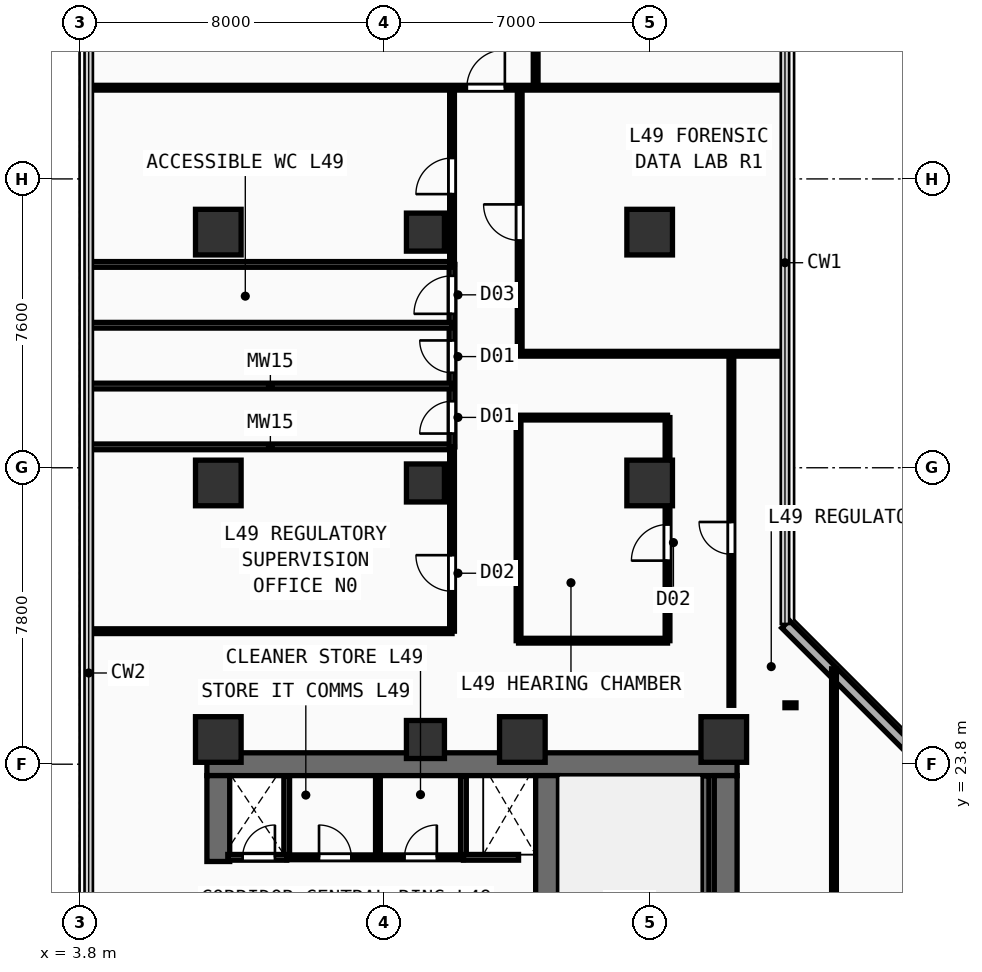
"""IFC4 building model, lengths in metres.
Left out: names, types, materials, properties, quantities, classifications, styles, units other than length and angle.
Written with IfcOpenShell. Run it as: python <this file> out.ifc"""

import sys

from ifc_helpers import new_model, si_unit, direction, frame, frame_2d, origin, origin_2d, place, context, subcontext, project, spatial, rectangle, extrude, element, fill, save


model = new_model("IFC4")
c1 = context("Model", 3, precision=1e-05, world=origin(), true_north=direction((0.0, 1.0)))
c2 = subcontext(c1, "Body", "Model", "MODEL_VIEW")
j1 = project(units=[si_unit("LENGTHUNIT", "METRE"), si_unit("PLANEANGLEUNIT", "RADIAN")], contexts=[c1])
p1 = place(None, origin())
s1 = spatial("IfcSite", under=j1, at=p1, CompositionType="ELEMENT")
p2 = place(p1, origin())
s2 = spatial("IfcBuilding", under=s1, at=p2, CompositionType="ELEMENT")
p3 = place(p2, frame((0.0, 0.0, 191.8)))
s3 = spatial("IfcBuildingStorey", under=s2, at=p3, CompositionType="ELEMENT", Elevation=191.8)
p4 = place(p3, frame((7.15, 23.8, 0.0), z_axis=(0.0, 0.0, 1.0), x_axis=(1.0, 0.0, 0.0)))
e1 = element("IfcWall", 1, at=p4, inside=s3, PredefinedType="SHEAR", context=c2, shape_type="SweptSolid", body=[
    extrude(rectangle(XDim=13.95, YDim=0.6, at=frame_2d((6.975, 0.0))), origin(), (0.0, 0.0, 1.0), 3.56),
])
p5 = place(p3, frame((7.45, 21.24, 0.0), z_axis=(0.0, 0.0, 1.0), x_axis=(0.0, 1.0, 0.0)))
e2 = element("IfcWall", 2, at=p5, inside=s3, PredefinedType="SHEAR", context=c2, shape_type="SweptSolid", body=[
    extrude(rectangle(XDim=2.26, YDim=0.6, at=frame_2d((1.13, 0.0))), origin(), (0.0, 0.0, 1.0), 3.56),
])
p6 = place(p3, frame((20.8, 17.35, 0.0), z_axis=(0.0, 0.0, 1.0), x_axis=(0.0, 1.0, 0.0)))
e3 = element("IfcWall", 3, at=p6, inside=s3, PredefinedType="SHEAR", context=c2, shape_type="SweptSolid", body=[
    extrude(rectangle(XDim=6.15, YDim=0.6, at=frame_2d((3.075, 0.0))), origin(), (0.0, 0.0, 1.0), 3.56),
])
p7 = place(p3, frame((16.1, 14.4, 0.0), z_axis=(0.0, 0.0, 1.0), x_axis=(0.0, 1.0, 0.0)))
e4 = element("IfcWall", 4, at=p7, inside=s3, PredefinedType="SHEAR", context=c2, shape_type="SweptSolid", body=[
    extrude(rectangle(XDim=9.1, YDim=0.6, at=frame_2d((4.55, 0.0))), origin(), (0.0, 0.0, 1.0), 3.56),
])
for number, where, z_axis, x_axis in (
    (5, (7.45, 24.45, 0.0), (0.0, 0.0, 1.0), (1.0, 0.0, 0.0)),
    (6, (15.45, 24.45, 0.0), (0.0, 0.0, 1.0), (1.0, 0.0, 0.0)),
    (7, (20.75, 24.45, 0.0), (0.0, 0.0, 1.0), (1.0, 0.0, 0.0)),
    (8, (7.45, 31.2, 0.0), (0.0, 0.0, 1.0), (1.0, 0.0, 0.0)),
    (9, (7.45, 37.8, 0.0), (0.0, 0.0, 1.0), (1.0, 0.0, 0.0)),
    (10, (18.8, 31.2, 0.0), (0.0, 0.0, 1.0), (1.0, 0.0, 0.0)),
    (11, (18.8, 37.8, 0.0), (0.0, 0.0, 1.0), (1.0, 0.0, 0.0)),
):
    element("IfcColumn", number, at=place(p3, frame(where, z_axis=z_axis, x_axis=x_axis)), inside=s3, PredefinedType="COLUMN", context=c2, shape_type="SweptSolid", body=[
        extrude(rectangle(XDim=1.2, YDim=1.2, at=origin_2d()), origin(), (0.0, 0.0, 1.0), 3.56),
    ])
for number, where, z_axis, x_axis in (
    (12, (12.9, 24.45, 0.0), (0.0, 0.0, 1.0), (1.0, 0.0, 0.0)),
    (13, (12.9, 31.2, 0.0), (0.0, 0.0, 1.0), (1.0, 0.0, 0.0)),
    (14, (12.9, 37.8, 0.0), (0.0, 0.0, 1.0), (1.0, 0.0, 0.0)),
):
    element("IfcColumn", number, at=place(p3, frame(where, z_axis=z_axis, x_axis=x_axis)), inside=s3, PredefinedType="COLUMN", context=c2, shape_type="SweptSolid", body=[
        extrude(rectangle(XDim=1.0, YDim=1.0, at=origin_2d()), origin(), (0.0, 0.0, 1.0), 3.56),
    ])
p8 = place(p3, frame((28.885, 20.975, 0.0), z_axis=(0.0, 0.0, 1.0), x_axis=(-0.707106781187, 0.707106781187, 0.0)))
e15 = element("IfcWall", 15, at=p8, inside=s3, PredefinedType="SOLIDWALL", context=c2, shape_type="SweptSolid", body=[
    extrude(rectangle(XDim=9.207, YDim=0.28, at=frame_2d((4.603, 0.0))), origin(), (0.0, 0.0, 1.0), 3.56),
])
p9 = place(p3, frame((20.26, 15.4, 0.0), z_axis=(0.0, 0.0, 1.0), x_axis=(0.0, 1.0, 0.0)))
e16 = element("IfcWall", 16, at=p9, inside=s3, PredefinedType="SHEAR", context=c2, shape_type="SweptSolid", body=[
    extrude(rectangle(XDim=8.09, YDim=0.2, at=frame_2d((4.045, 0.0))), origin(), (0.0, 0.0, 1.0), 3.56),
])
for number, where, z_axis, x_axis in (
    (17, (9.25, 21.35, 0.0), (0.0, 0.0, 1.0), (0.0, 1.0, 0.0)),
    (18, (13.9, 21.35, 0.0), (0.0, 0.0, 1.0), (0.0, 1.0, 0.0)),
):
    element("IfcWall", number, at=place(p3, frame(where, z_axis=z_axis, x_axis=x_axis)), inside=s3, PredefinedType="PARTITIONING", context=c2, shape_type="SweptSolid", body=[
        extrude(rectangle(XDim=2.13, YDim=0.15, at=frame_2d((1.065, 0.0))), origin(), (0.0, 0.0, 1.0), 3.56),
    ])
p10 = place(p3, frame((7.7, 21.35, 0.0), z_axis=(0.0, 0.0, 1.0), x_axis=(1.0, 0.0, 0.0)))
e19 = element("IfcWall", 19, at=p10, inside=s3, PredefinedType="PARTITIONING", context=c2, shape_type="SweptSolid", body=[
    extrude(rectangle(XDim=1.55, YDim=0.15, at=frame_2d((0.775, 0.0))), origin(), (0.0, 0.0, 1.0), 3.56),
])
p11 = place(p10, frame((0.39, 0.0, 0.0)))
e20 = element("IfcOpeningElement", 20, at=p11, cuts=e19, PredefinedType="OPENING", context=c2, shape_type="SweptSolid", body=[
    extrude(rectangle(XDim=0.85, YDim=2.15, at=frame_2d((0.425, 1.075))), frame((0.0, 0.085, 0.0), z_axis=(0.0, -1.0, 0.0), x_axis=(1.0, 0.0, 0.0)), (0.0, 0.0, 1.0), 0.17),
])
p12 = place(p3, frame((13.9, 21.35, 0.0), z_axis=(0.0, 0.0, 1.0), x_axis=(1.0, 0.0, 0.0)))
e21 = element("IfcWall", 21, at=p12, inside=s3, PredefinedType="PARTITIONING", context=c2, shape_type="SweptSolid", body=[
    extrude(rectangle(XDim=1.45, YDim=0.15, at=frame_2d((0.725, 0.0))), origin(), (0.0, 0.0, 1.0), 3.56),
])
p13 = place(p3, frame((9.25, 21.35, 0.0), z_axis=(0.0, 0.0, 1.0), x_axis=(1.0, 0.0, 0.0)))
e22 = element("IfcWall", 22, at=p13, inside=s3, PredefinedType="PARTITIONING", context=c2, shape_type="SweptSolid", body=[
    extrude(rectangle(XDim=4.65, YDim=0.125, at=frame_2d((2.325, 0.0))), origin(), (0.0, 0.0, 1.0), 3.56),
])
p14 = place(p13, frame((0.85, 0.0, 0.0)))
e23 = element("IfcOpeningElement", 23, at=p14, cuts=e22, PredefinedType="OPENING", context=c2, shape_type="SweptSolid", body=[
    extrude(rectangle(XDim=0.85, YDim=2.15, at=frame_2d((0.425, 1.075))), frame((0.0, 0.073, 0.0), z_axis=(0.0, -1.0, 0.0), x_axis=(1.0, 0.0, 0.0)), (0.0, 0.0, 1.0), 0.145),
])
p15 = place(p13, frame((3.1, 0.0, 0.0)))
e24 = element("IfcOpeningElement", 24, at=p15, cuts=e22, PredefinedType="OPENING", context=c2, shape_type="SweptSolid", body=[
    extrude(rectangle(XDim=0.85, YDim=2.15, at=frame_2d((0.425, 1.075))), frame((0.0, 0.073, 0.0), z_axis=(0.0, -1.0, 0.0), x_axis=(1.0, 0.0, 0.0)), (0.0, 0.0, 1.0), 0.145),
])
p16 = place(p3, frame((11.65, 21.35, 0.0), z_axis=(0.0, 0.0, 1.0), x_axis=(0.0, 1.0, 0.0)))
e25 = element("IfcWall", 25, at=p16, inside=s3, PredefinedType="PARTITIONING", context=c2, shape_type="SweptSolid", body=[
    extrude(rectangle(XDim=2.13, YDim=0.125, at=frame_2d((1.065, 0.0))), origin(), (0.0, 0.0, 1.0), 3.56),
])
for number, where, z_axis, x_axis in (
    (26, (15.35, 27.05, 0.0), (0.0, 0.0, 1.0), (1.0, 0.0, 0.0)),
    (27, (15.35, 32.92, 0.0), (0.0, 0.0, 1.0), (1.0, 0.0, 0.0)),
):
    element("IfcWall", number, at=place(p3, frame(where, z_axis=z_axis, x_axis=x_axis)), inside=s3, PredefinedType="PARTITIONING", context=c2, shape_type="SweptSolid", body=[
        extrude(rectangle(XDim=3.92, YDim=0.125, at=frame_2d((1.96, 0.0))), origin(), (0.0, 0.0, 1.0), 3.56),
    ])
p17 = place(p3, frame((15.35, 27.05, 0.0), z_axis=(0.0, 0.0, 1.0), x_axis=(0.0, 1.0, 0.0)))
e28 = element("IfcWall", 28, at=p17, inside=s3, PredefinedType="PARTITIONING", context=c2, shape_type="SweptSolid", body=[
    extrude(rectangle(XDim=5.87, YDim=0.125, at=frame_2d((2.935, 0.0))), origin(), (0.0, 0.0, 1.0), 3.56),
])
p18 = place(p3, frame((19.27, 27.05, 0.0), z_axis=(0.0, 0.0, 1.0), x_axis=(0.0, 1.0, 0.0)))
e29 = element("IfcWall", 29, at=p18, inside=s3, PredefinedType="PARTITIONING", context=c2, shape_type="SweptSolid", body=[
    extrude(rectangle(XDim=5.87, YDim=0.125, at=frame_2d((2.935, 0.0))), origin(), (0.0, 0.0, 1.0), 3.56),
])
p19 = place(p18, frame((2.106, 0.0, 0.0)))
e30 = element("IfcOpeningElement", 30, at=p19, cuts=e29, PredefinedType="OPENING", context=c2, shape_type="SweptSolid", body=[
    extrude(rectangle(XDim=0.95, YDim=2.15, at=frame_2d((0.475, 1.075))), frame((0.0, 0.073, 0.0), z_axis=(0.0, -1.0, 0.0), x_axis=(1.0, 0.0, 0.0)), (0.0, 0.0, 1.0), 0.145),
])
p20 = place(p3, frame((13.6, 27.3, 0.0), z_axis=(0.0, 0.0, 1.0), x_axis=(0.0, 1.0, 0.0)))
e31 = element("IfcWall", 31, at=p20, inside=s3, PredefinedType="PARTITIONING", context=c2, shape_type="SweptSolid", body=[
    extrude(rectangle(XDim=4.85, YDim=0.125, at=frame_2d((2.425, 0.0))), origin(), (0.0, 0.0, 1.0), 3.56),
])
p21 = place(p20, frame((1.05, 0.0, 0.0)))
e32 = element("IfcOpeningElement", 32, at=p21, cuts=e31, PredefinedType="OPENING", context=c2, shape_type="SweptSolid", body=[
    extrude(rectangle(XDim=0.95, YDim=2.15, at=frame_2d((0.475, 1.075))), frame((0.0, 0.073, 0.0), z_axis=(0.0, -1.0, 0.0), x_axis=(1.0, 0.0, 0.0)), (0.0, 0.0, 1.0), 0.145),
])
p22 = place(p3, frame((4.04, 27.3, 0.0), z_axis=(0.0, 0.0, 1.0), x_axis=(1.0, 0.0, 0.0)))
e33 = element("IfcWall", 33, at=p22, inside=s3, PredefinedType="PARTITIONING", context=c2, shape_type="SweptSolid", body=[
    extrude(rectangle(XDim=9.56, YDim=0.125, at=frame_2d((4.78, 0.0))), origin(), (0.0, 0.0, 1.0), 3.56),
])
p23 = place(p3, frame((4.04, 32.15, 0.0), z_axis=(0.0, 0.0, 1.0), x_axis=(1.0, 0.0, 0.0)))
e34 = element("IfcWall", 34, at=p23, inside=s3, PredefinedType="PLUMBINGWALL", context=c2, shape_type="SweptSolid", body=[
    extrude(rectangle(XDim=9.56, YDim=0.15, at=frame_2d((4.78, 0.0))), origin(), (0.0, 0.0, 1.0), 3.56),
])
p24 = place(p3, frame((13.6, 32.15, 0.0), z_axis=(0.0, 0.0, 1.0), x_axis=(0.0, 1.0, 0.0)))
e35 = element("IfcWall", 35, at=p24, inside=s3, PredefinedType="PLUMBINGWALL", context=c2, shape_type="SweptSolid", body=[
    extrude(rectangle(XDim=4.8, YDim=0.15, at=frame_2d((2.4, 0.0))), origin(), (0.0, 0.0, 1.0), 3.56),
])
p25 = place(p24, frame((0.35, 0.0, 0.0)))
e36 = element("IfcOpeningElement", 36, at=p25, cuts=e35, PredefinedType="OPENING", context=c2, shape_type="SweptSolid", body=[
    extrude(rectangle(XDim=0.85, YDim=2.15, at=frame_2d((0.425, 1.075))), frame((0.0, 0.085, 0.0), z_axis=(0.0, -1.0, 0.0), x_axis=(1.0, 0.0, 0.0)), (0.0, 0.0, 1.0), 0.17),
])
p26 = place(p24, frame((1.95, 0.0, 0.0)))
e37 = element("IfcOpeningElement", 37, at=p26, cuts=e35, PredefinedType="OPENING", context=c2, shape_type="SweptSolid", body=[
    extrude(rectangle(XDim=0.85, YDim=2.15, at=frame_2d((0.425, 1.075))), frame((0.0, 0.085, 0.0), z_axis=(0.0, -1.0, 0.0), x_axis=(1.0, 0.0, 0.0)), (0.0, 0.0, 1.0), 0.17),
])
p27 = place(p24, frame((3.5, 0.0, 0.0)))
e38 = element("IfcOpeningElement", 38, at=p27, cuts=e35, PredefinedType="OPENING", context=c2, shape_type="SweptSolid", body=[
    extrude(rectangle(XDim=1.0, YDim=2.2, at=frame_2d((0.5, 1.1))), frame((0.0, 0.085, 0.0), z_axis=(0.0, -1.0, 0.0), x_axis=(1.0, 0.0, 0.0)), (0.0, 0.0, 1.0), 0.17),
])
for number, where, z_axis, x_axis in (
    (39, (4.04, 33.75, 0.0), (0.0, 0.0, 1.0), (1.0, 0.0, 0.0)),
    (40, (4.04, 35.35, 0.0), (0.0, 0.0, 1.0), (1.0, 0.0, 0.0)),
):
    element("IfcWall", number, at=place(p3, frame(where, z_axis=z_axis, x_axis=x_axis)), inside=s3, PredefinedType="PLUMBINGWALL", context=c2, shape_type="SweptSolid", body=[
        extrude(rectangle(XDim=9.56, YDim=0.15, at=frame_2d((4.78, 0.0))), origin(), (0.0, 0.0, 1.0), 3.2),
    ])
p28 = place(p3, frame((4.04, 36.95, 0.0), z_axis=(0.0, 0.0, 1.0), x_axis=(1.0, 0.0, 0.0)))
e41 = element("IfcWall", 41, at=p28, inside=s3, PredefinedType="PLUMBINGWALL", context=c2, shape_type="SweptSolid", body=[
    extrude(rectangle(XDim=9.56, YDim=0.15, at=frame_2d((4.78, 0.0))), origin(), (0.0, 0.0, 1.0), 3.56),
])
p29 = place(p3, frame((20.95, 25.35, 0.0), z_axis=(0.0, 0.0, 1.0), x_axis=(0.0, 1.0, 0.0)))
e42 = element("IfcWall", 42, at=p29, inside=s3, PredefinedType="PARTITIONING", context=c2, shape_type="SweptSolid", body=[
    extrude(rectangle(XDim=9.25, YDim=0.125, at=frame_2d((4.625, 0.0))), origin(), (0.0, 0.0, 1.0), 3.56),
])
p30 = place(p29, frame((3.973, 0.0, 0.0)))
e43 = element("IfcOpeningElement", 43, at=p30, cuts=e42, PredefinedType="OPENING", context=c2, shape_type="SweptSolid", body=[
    extrude(rectangle(XDim=0.85, YDim=2.15, at=frame_2d((0.425, 1.075))), frame((0.0, 0.073, 0.0), z_axis=(0.0, -1.0, 0.0), x_axis=(1.0, 0.0, 0.0)), (0.0, 0.0, 1.0), 0.145),
])
p31 = place(p3, frame((22.65, 25.35, 0.0), z_axis=(0.0, 0.0, 1.0), x_axis=(-1.0, 0.0, 0.0)))
e44 = element("IfcWall", 44, at=p31, inside=s3, PredefinedType="PARTITIONING", context=c2, shape_type="SweptSolid", body=[
    extrude(rectangle(XDim=0.29, YDim=0.125, at=frame_2d((0.145, 0.0))), origin(), (0.0, 0.0, 1.0), 3.56),
])
p32 = place(p3, frame((15.38, 34.6, 0.0), z_axis=(0.0, 0.0, 1.0), x_axis=(1.0, 0.0, 0.0)))
e45 = element("IfcWall", 45, at=p32, inside=s3, PredefinedType="PARTITIONING", context=c2, shape_type="SweptSolid", body=[
    extrude(rectangle(XDim=6.98, YDim=0.125, at=frame_2d((3.49, 0.0))), origin(), (0.0, 0.0, 1.0), 3.56),
])
p33 = place(p3, frame((23.65, 16.59, 0.0), z_axis=(0.0, 0.0, 1.0), x_axis=(0.0, 1.0, 0.0)))
e46 = element("IfcWall", 46, at=p33, inside=s3, PredefinedType="PARTITIONING", context=c2, shape_type="SweptSolid", body=[
    extrude(rectangle(XDim=9.72, YDim=0.125, at=frame_2d((4.86, 0.0))), origin(), (0.0, 0.0, 1.0), 3.56),
])
p34 = place(p3, frame((13.6, 36.95, 0.0), z_axis=(0.0, 0.0, 1.0), x_axis=(0.0, 1.0, 0.0)))
e47 = element("IfcWall", 47, at=p34, inside=s3, PredefinedType="PARTITIONING", context=c2, shape_type="SweptSolid", body=[
    extrude(rectangle(XDim=4.65, YDim=0.125, at=frame_2d((2.325, 0.0))), origin(), (0.0, 0.0, 1.0), 3.56),
])
p35 = place(p34, frame((1.85, 0.0, 0.0)))
e48 = element("IfcOpeningElement", 48, at=p35, cuts=e47, PredefinedType="OPENING", context=c2, shape_type="SweptSolid", body=[
    extrude(rectangle(XDim=0.95, YDim=2.15, at=frame_2d((0.475, 1.075))), frame((0.0, 0.073, 0.0), z_axis=(0.0, -1.0, 0.0), x_axis=(1.0, 0.0, 0.0)), (0.0, 0.0, 1.0), 0.145),
])
p36 = place(p3, frame((4.04, 41.6, 0.0), z_axis=(0.0, 0.0, 1.0), x_axis=(1.0, 0.0, 0.0)))
e49 = element("IfcWall", 49, at=p36, inside=s3, PredefinedType="PARTITIONING", context=c2, shape_type="SweptSolid", body=[
    extrude(rectangle(XDim=18.32, YDim=0.125, at=frame_2d((9.16, 0.0))), origin(), (0.0, 0.0, 1.0), 3.56),
])
p37 = place(p36, frame((9.95, 0.0, 0.0)))
e50 = element("IfcOpeningElement", 50, at=p37, cuts=e49, PredefinedType="OPENING", context=c2, shape_type="SweptSolid", body=[
    extrude(rectangle(XDim=1.0, YDim=2.2, at=frame_2d((0.5, 1.1))), frame((0.0, 0.073, 0.0), z_axis=(0.0, -1.0, 0.0), x_axis=(1.0, 0.0, 0.0)), (0.0, 0.0, 1.0), 0.145),
])
p38 = place(p3, frame((15.8, 41.6, 0.0), z_axis=(0.0, 0.0, 1.0), x_axis=(0.0, 1.0, 0.0)))
e51 = element("IfcWall", 51, at=p38, inside=s3, PredefinedType="PARTITIONING", context=c2, shape_type="SweptSolid", body=[
    extrude(rectangle(XDim=7.76, YDim=0.125, at=frame_2d((3.88, 0.0))), origin(), (0.0, 0.0, 1.0), 3.56),
])
p39 = place(p38, frame((3.47, 0.0, 0.0)))
e52 = element("IfcOpeningElement", 52, at=p39, cuts=e51, PredefinedType="OPENING", context=c2, shape_type="SweptSolid", body=[
    extrude(rectangle(XDim=0.95, YDim=2.15, at=frame_2d((0.475, 1.075))), frame((0.0, 0.073, 0.0), z_axis=(0.0, -1.0, 0.0), x_axis=(1.0, 0.0, 0.0)), (0.0, 0.0, 1.0), 0.145),
])
p40 = place(p3, frame((15.38, 34.65, 0.0), z_axis=(0.0, 0.0, 1.0), x_axis=(0.0, 1.0, 0.0)))
e53 = element("IfcWall", 53, at=p40, inside=s3, PredefinedType="PARTITIONING", context=c2, shape_type="SweptSolid", body=[
    extrude(rectangle(XDim=6.95, YDim=0.125, at=frame_2d((3.475, 0.0))), origin(), (0.0, 0.0, 1.0), 3.56),
])
p41 = place(p40, frame((2.93, 0.0, 0.0)))
e54 = element("IfcOpeningElement", 54, at=p41, cuts=e53, PredefinedType="OPENING", context=c2, shape_type="SweptSolid", body=[
    extrude(rectangle(XDim=0.95, YDim=2.15, at=frame_2d((0.475, 1.075))), frame((0.0, 0.073, 0.0), z_axis=(0.0, -1.0, 0.0), x_axis=(1.0, 0.0, 0.0)), (0.0, 0.0, 1.0), 0.145),
])
p42 = place(p11, origin())
e55 = element("IfcDoor", 55, at=p42, inside=s3, OperationType="SINGLE_SWING_RIGHT", PredefinedType="DOOR", context=c2, shape_type="SweptSolid", body=[
    extrude(rectangle(XDim=0.85, YDim=2.15, at=frame_2d((0.425, 1.075))), frame((0.0, 0.025, 0.0), z_axis=(0.0, -1.0, 0.0), x_axis=(1.0, 0.0, 0.0)), (0.0, 0.0, 1.0), 0.05),
])
fill(e20, e55)
p43 = place(p14, origin())
e56 = element("IfcDoor", 56, at=p43, inside=s3, OperationType="SINGLE_SWING_LEFT", PredefinedType="DOOR", context=c2, shape_type="SweptSolid", body=[
    extrude(rectangle(XDim=0.85, YDim=2.15, at=frame_2d((0.425, 1.075))), frame((0.0, 0.025, 0.0), z_axis=(0.0, -1.0, 0.0), x_axis=(1.0, 0.0, 0.0)), (0.0, 0.0, 1.0), 0.05),
])
fill(e23, e56)
p44 = place(p15, origin())
e57 = element("IfcDoor", 57, at=p44, inside=s3, OperationType="SINGLE_SWING_RIGHT", PredefinedType="DOOR", context=c2, shape_type="SweptSolid", body=[
    extrude(rectangle(XDim=0.85, YDim=2.15, at=frame_2d((0.425, 1.075))), frame((0.0, 0.025, 0.0), z_axis=(0.0, -1.0, 0.0), x_axis=(1.0, 0.0, 0.0)), (0.0, 0.0, 1.0), 0.05),
])
fill(e24, e57)
p45 = place(p19, origin())
e58 = element("IfcDoor", 58, at=p45, inside=s3, OperationType="SINGLE_SWING_LEFT", PredefinedType="DOOR", context=c2, shape_type="SweptSolid", body=[
    extrude(rectangle(XDim=0.95, YDim=2.15, at=frame_2d((0.475, 1.075))), frame((0.0, 0.025, 0.0), z_axis=(0.0, -1.0, 0.0), x_axis=(1.0, 0.0, 0.0)), (0.0, 0.0, 1.0), 0.05),
])
fill(e30, e58)
p46 = place(p21, origin())
e59 = element("IfcDoor", 59, at=p46, inside=s3, OperationType="SINGLE_SWING_RIGHT", PredefinedType="DOOR", context=c2, shape_type="SweptSolid", body=[
    extrude(rectangle(XDim=0.95, YDim=2.15, at=frame_2d((0.475, 1.075))), frame((0.0, 0.025, 0.0), z_axis=(0.0, -1.0, 0.0), x_axis=(1.0, 0.0, 0.0)), (0.0, 0.0, 1.0), 0.05),
])
fill(e32, e59)
p47 = place(p25, origin())
e60 = element("IfcDoor", 60, at=p47, inside=s3, OperationType="SINGLE_SWING_LEFT", PredefinedType="DOOR", context=c2, shape_type="SweptSolid", body=[
    extrude(rectangle(XDim=0.85, YDim=2.15, at=frame_2d((0.425, 1.075))), frame((0.0, 0.025, 0.0), z_axis=(0.0, -1.0, 0.0), x_axis=(1.0, 0.0, 0.0)), (0.0, 0.0, 1.0), 0.05),
])
fill(e36, e60)
p48 = place(p26, origin())
e61 = element("IfcDoor", 61, at=p48, inside=s3, OperationType="SINGLE_SWING_RIGHT", PredefinedType="DOOR", context=c2, shape_type="SweptSolid", body=[
    extrude(rectangle(XDim=0.85, YDim=2.15, at=frame_2d((0.425, 1.075))), frame((0.0, 0.025, 0.0), z_axis=(0.0, -1.0, 0.0), x_axis=(1.0, 0.0, 0.0)), (0.0, 0.0, 1.0), 0.05),
])
fill(e37, e61)
p49 = place(p27, origin())
e62 = element("IfcDoor", 62, at=p49, inside=s3, OperationType="SINGLE_SWING_LEFT", PredefinedType="DOOR", context=c2, shape_type="SweptSolid", body=[
    extrude(rectangle(XDim=1.0, YDim=2.2, at=frame_2d((0.5, 1.1))), frame((0.0, 0.025, 0.0), z_axis=(0.0, -1.0, 0.0), x_axis=(1.0, 0.0, 0.0)), (0.0, 0.0, 1.0), 0.05),
])
fill(e38, e62)
p50 = place(p30, origin())
e63 = element("IfcDoor", 63, at=p50, inside=s3, OperationType="SINGLE_SWING_RIGHT", PredefinedType="DOOR", context=c2, shape_type="SweptSolid", body=[
    extrude(rectangle(XDim=0.85, YDim=2.15, at=frame_2d((0.425, 1.075))), frame((0.0, 0.025, 0.0), z_axis=(0.0, -1.0, 0.0), x_axis=(1.0, 0.0, 0.0)), (0.0, 0.0, 1.0), 0.05),
])
fill(e43, e63)
p51 = place(p35, origin())
e64 = element("IfcDoor", 64, at=p51, inside=s3, OperationType="SINGLE_SWING_LEFT", PredefinedType="DOOR", context=c2, shape_type="SweptSolid", body=[
    extrude(rectangle(XDim=0.95, YDim=2.15, at=frame_2d((0.475, 1.075))), frame((0.0, 0.025, 0.0), z_axis=(0.0, -1.0, 0.0), x_axis=(1.0, 0.0, 0.0)), (0.0, 0.0, 1.0), 0.05),
])
fill(e48, e64)
p52 = place(p37, origin())
e65 = element("IfcDoor", 65, at=p52, inside=s3, OperationType="SINGLE_SWING_RIGHT", PredefinedType="DOOR", context=c2, shape_type="SweptSolid", body=[
    extrude(rectangle(XDim=1.0, YDim=2.2, at=frame_2d((0.5, 1.1))), frame((0.0, 0.025, 0.0), z_axis=(0.0, -1.0, 0.0), x_axis=(1.0, 0.0, 0.0)), (0.0, 0.0, 1.0), 0.05),
])
fill(e50, e65)
p53 = place(p41, origin())
e66 = element("IfcDoor", 66, at=p53, inside=s3, OperationType="SINGLE_SWING_RIGHT", PredefinedType="DOOR", context=c2, shape_type="SweptSolid", body=[
    extrude(rectangle(XDim=0.95, YDim=2.15, at=frame_2d((0.475, 1.075))), frame((0.0, 0.025, 0.0), z_axis=(0.0, -1.0, 0.0), x_axis=(1.0, 0.0, 0.0)), (0.0, 0.0, 1.0), 0.05),
])
fill(e54, e66)
save(model, sys.argv[1])
